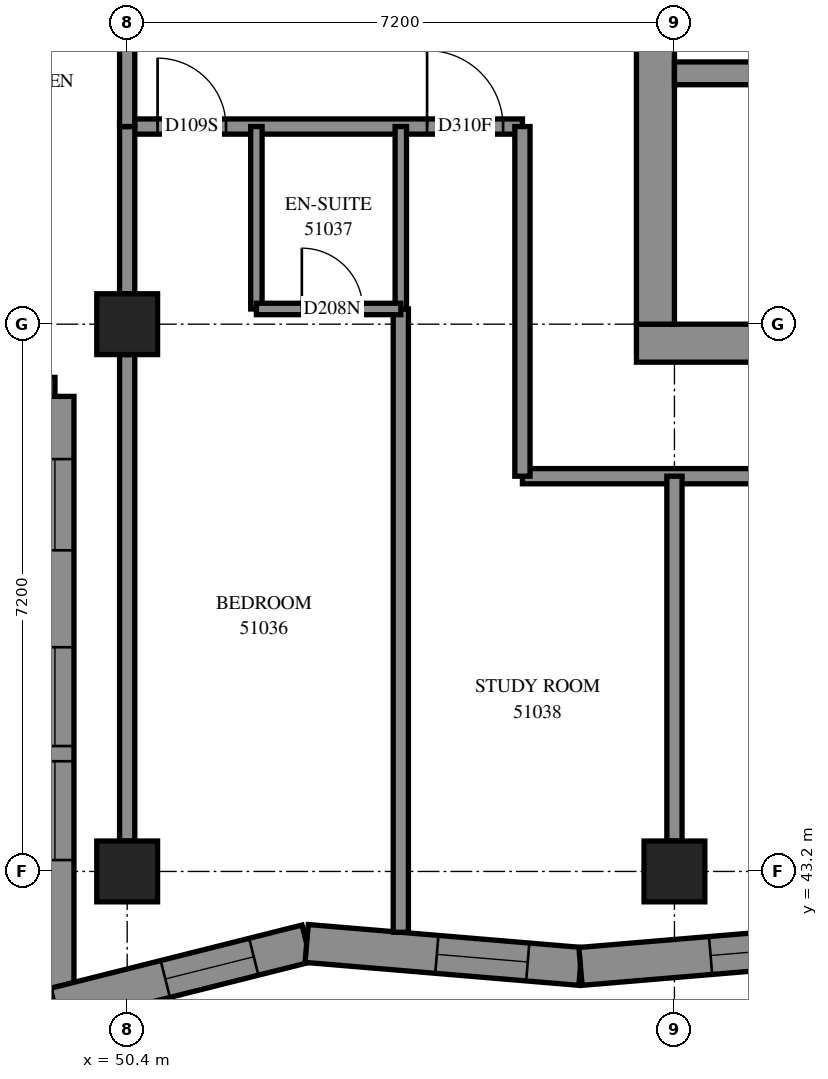
"""IFC4 building model, lengths in metres.
Left out: names, types, materials, properties, quantities, classifications, styles, units other than length and angle.
Written with IfcOpenShell. Run it as: python <this file> out.ifc"""

import sys

from ifc_helpers import new_model, si_unit, direction, frame, frame_2d, origin, origin_2d, place, context, subcontext, project, spatial, polyline, rectangle, outline, extrude, element, fill, save


model = new_model("IFC4")
c1 = context("Model", 3, precision=1e-05, world=origin(), true_north=direction((0.0, 1.0)))
c2 = subcontext(c1, "Body", "Model", "MODEL_VIEW")
j1 = project(units=[si_unit("LENGTHUNIT", "METRE"), si_unit("PLANEANGLEUNIT", "RADIAN")], contexts=[c1])
p1 = place(None, origin())
s1 = spatial("IfcSite", under=j1, at=p1, CompositionType="ELEMENT")
p2 = place(p1, origin())
s2 = spatial("IfcBuilding", under=s1, at=p2, CompositionType="ELEMENT")
p3 = place(p2, frame((0.0, 0.0, 189.6)))
s3 = spatial("IfcBuildingStorey", under=s2, at=p3, CompositionType="ELEMENT", Elevation=189.6)
for number, where, z_axis, x_axis in (
    (1, (50.4, 43.2, 0.0), (0.0, 0.0, 1.0), (1.0, 0.0, 0.0)),
    (2, (50.4, 50.4, 0.0), (0.0, 0.0, 1.0), (1.0, 0.0, 0.0)),
    (3, (57.6, 43.2, 0.0), (0.0, 0.0, 1.0), (1.0, 0.0, 0.0)),
):
    element("IfcColumn", number, at=place(p3, frame(where, z_axis=z_axis, x_axis=x_axis)), inside=s3, PredefinedType="COLUMN", context=c2, shape_type="SweptSolid", body=[
        extrude(rectangle(XDim=0.8, YDim=0.8, at=origin_2d()), origin(), (0.0, 0.0, 1.0), 3.1),
    ])
p4 = place(p3, frame((57.1, 50.15, -0.3), z_axis=(0.0, 0.0, 1.0), x_axis=(1.0, 0.0, 0.0)))
e4 = element("IfcWall", 4, at=p4, inside=s3, PredefinedType="SHEAR", context=c2, shape_type="SweptSolid", body=[
    extrude(rectangle(XDim=15.4, YDim=0.5, at=frame_2d((7.7, 0.0))), origin(), (0.0, 0.0, 1.0), 2.7),
])
p5 = place(p3, frame((57.35, 50.4, -0.3), z_axis=(0.0, 0.0, 1.0), x_axis=(0.0, 1.0, 0.0)))
e5 = element("IfcWall", 5, at=p5, inside=s3, PredefinedType="SHEAR", context=c2, shape_type="SweptSolid", body=[
    extrude(rectangle(XDim=14.4, YDim=0.5, at=frame_2d((7.2, 0.0))), origin(), (0.0, 0.0, 1.0), 2.7),
])
p6 = place(p5, frame((4.55, 0.0, 0.3)))
e6 = element("IfcOpeningElement", 6, at=p6, cuts=e5, PredefinedType="OPENING", context=c2, shape_type="SweptSolid", body=[
    extrude(rectangle(XDim=1.1, YDim=2.1, at=frame_2d((0.55, 1.05))), frame((0.0, 0.26, 0.0), z_axis=(0.0, -1.0, 0.0), x_axis=(1.0, 0.0, 0.0)), (0.0, 0.0, 1.0), 0.52),
])
p7 = place(p5, frame((11.35, 0.0, 0.3)))
e7 = element("IfcOpeningElement", 7, at=p7, cuts=e5, PredefinedType="OPENING", context=c2, shape_type="SweptSolid", body=[
    extrude(rectangle(XDim=1.1, YDim=2.1, at=frame_2d((0.55, 1.05))), frame((0.0, 0.26, 0.0), z_axis=(0.0, -1.0, 0.0), x_axis=(1.0, 0.0, 0.0)), (0.0, 0.0, 1.0), 0.52),
])
p8 = place(p3, frame((57.6, 53.7, 0.0), z_axis=(0.0, 0.0, 1.0), x_axis=(1.0, 0.0, 0.0)))
e8 = element("IfcWall", 8, at=p8, inside=s3, PredefinedType="SOLIDWALL", context=c2, shape_type="SweptSolid", body=[
    extrude(rectangle(XDim=14.4, YDim=0.3, at=frame_2d((7.2, 0.0))), origin(), (0.0, 0.0, 1.0), 3.1),
])
p9 = place(p8, frame((1.35, 0.0, 0.0)))
e9 = element("IfcOpeningElement", 9, at=p9, cuts=e8, PredefinedType="OPENING", context=c2, shape_type="SweptSolid", body=[
    extrude(rectangle(XDim=0.9, YDim=2.1, at=frame_2d((0.45, 1.05))), frame((0.0, 0.16, 0.0), z_axis=(0.0, -1.0, 0.0), x_axis=(1.0, 0.0, 0.0)), (0.0, 0.0, 1.0), 0.32),
])
p10 = place(p8, frame((4.95, 0.0, 0.0)))
e10 = element("IfcOpeningElement", 10, at=p10, cuts=e8, PredefinedType="OPENING", context=c2, shape_type="SweptSolid", body=[
    extrude(rectangle(XDim=0.9, YDim=2.1, at=frame_2d((0.45, 1.05))), frame((0.0, 0.16, 0.0), z_axis=(0.0, -1.0, 0.0), x_axis=(1.0, 0.0, 0.0)), (0.0, 0.0, 1.0), 0.32),
])
p11 = place(p8, frame((8.55, 0.0, 0.0)))
e11 = element("IfcOpeningElement", 11, at=p11, cuts=e8, PredefinedType="OPENING", context=c2, shape_type="SweptSolid", body=[
    extrude(rectangle(XDim=0.9, YDim=2.1, at=frame_2d((0.45, 1.05))), frame((0.0, 0.16, 0.0), z_axis=(0.0, -1.0, 0.0), x_axis=(1.0, 0.0, 0.0)), (0.0, 0.0, 1.0), 0.32),
])
p12 = place(p8, frame((12.05, 0.0, 0.0)))
e12 = element("IfcOpeningElement", 12, at=p12, cuts=e8, PredefinedType="OPENING", context=c2, shape_type="SweptSolid", body=[
    extrude(rectangle(XDim=1.1, YDim=2.1, at=frame_2d((0.55, 1.05))), frame((0.0, 0.16, 0.0), z_axis=(0.0, -1.0, 0.0), x_axis=(1.0, 0.0, 0.0)), (0.0, 0.0, 1.0), 0.32),
])
p13 = place(p3, frame((42.25, 49.45, 0.0), z_axis=(0.0, 0.0, 1.0), x_axis=(1.0, 0.0, 0.0)))
e13 = element("IfcWall", 13, at=p13, inside=s3, PredefinedType="SOLIDWALL", context=c2, shape_type="SweptSolid", body=[
    extrude(outline(polyline([(-0.25, -0.25), (6.95, -0.25), (7.45, 0.25), (0.25, 0.25), (-0.25, -0.25)])), origin(), (0.0, 0.0, 1.0), 3.1),
])
p14 = place(p13, frame((1.35, 0.0, 0.45)))
e14 = element("IfcOpeningElement", 14, at=p14, cuts=e13, PredefinedType="OPENING", context=c2, shape_type="SweptSolid", body=[
    extrude(rectangle(XDim=1.3, YDim=2.5, at=frame_2d((0.65, 1.25))), frame((0.0, 0.26, 0.0), z_axis=(0.0, -1.0, 0.0), x_axis=(1.0, 0.0, 0.0)), (0.0, 0.0, 1.0), 0.52),
])
p15 = place(p13, frame((2.85, 0.0, 0.45)))
e15 = element("IfcOpeningElement", 15, at=p15, cuts=e13, PredefinedType="OPENING", context=c2, shape_type="SweptSolid", body=[
    extrude(rectangle(XDim=1.3, YDim=2.5, at=frame_2d((0.65, 1.25))), frame((0.0, 0.26, 0.0), z_axis=(0.0, -1.0, 0.0), x_axis=(1.0, 0.0, 0.0)), (0.0, 0.0, 1.0), 0.52),
])
p16 = place(p13, frame((5.175, 0.0, 0.45)))
e16 = element("IfcOpeningElement", 16, at=p16, cuts=e13, PredefinedType="OPENING", context=c2, shape_type="SweptSolid", body=[
    extrude(rectangle(XDim=1.2, YDim=2.5, at=frame_2d((0.6, 1.25))), frame((0.0, 0.26, 0.0), z_axis=(0.0, -1.0, 0.0), x_axis=(1.0, 0.0, 0.0)), (0.0, 0.0, 1.0), 0.52),
])
p17 = place(p3, frame((49.45, 49.45, 0.0), z_axis=(0.0, 0.0, 1.0), x_axis=(0.0, -1.0, 0.0)))
e17 = element("IfcWall", 17, at=p17, inside=s3, PredefinedType="SOLIDWALL", context=c2, shape_type="SweptSolid", body=[
    extrude(outline(polyline([(0.25, -0.25), (8.35, -0.25), (7.709, 0.25), (-0.25, 0.25), (0.25, -0.25)])), origin(), (0.0, 0.0, 1.0), 3.1),
])
p18 = place(p17, frame((3.3, 0.0, 0.45)))
e18 = element("IfcOpeningElement", 18, at=p18, cuts=e17, PredefinedType="OPENING", context=c2, shape_type="SweptSolid", body=[
    extrude(rectangle(XDim=1.3, YDim=2.5, at=frame_2d((0.65, 1.25))), frame((0.0, 0.26, 0.0), z_axis=(0.0, -1.0, 0.0), x_axis=(1.0, 0.0, 0.0)), (0.0, 0.0, 1.0), 0.52),
])
p19 = place(p17, frame((4.8, 0.0, 0.45)))
e19 = element("IfcOpeningElement", 19, at=p19, cuts=e17, PredefinedType="OPENING", context=c2, shape_type="SweptSolid", body=[
    extrude(rectangle(XDim=1.3, YDim=2.5, at=frame_2d((0.65, 1.25))), frame((0.0, 0.26, 0.0), z_axis=(0.0, -1.0, 0.0), x_axis=(1.0, 0.0, 0.0)), (0.0, 0.0, 1.0), 0.52),
])
p20 = place(p17, frame((0.825, 0.0, 0.45)))
e20 = element("IfcOpeningElement", 20, at=p20, cuts=e17, PredefinedType="OPENING", context=c2, shape_type="SweptSolid", body=[
    extrude(rectangle(XDim=1.2, YDim=2.5, at=frame_2d((0.6, 1.25))), frame((0.0, 0.26, 0.0), z_axis=(0.0, -1.0, 0.0), x_axis=(1.0, 0.0, 0.0)), (0.0, 0.0, 1.0), 0.52),
])
p21 = place(p3, frame((49.45, 41.421, 0.0), z_axis=(0.0, 0.0, 1.0), x_axis=(0.9698558331, 0.2436794266, 0.0)))
e21 = element("IfcWall", 21, at=p21, inside=s3, PredefinedType="SOLIDWALL", context=c2, shape_type="SweptSolid", body=[
    extrude(outline(polyline([(-0.321, -0.25), (3.373, -0.25), (3.456, 0.25), (0.321, 0.25), (-0.321, -0.25)])), origin(), (0.0, 0.0, 1.0), 3.1),
])
p22 = place(p21, frame((1.497, 0.0, 0.45)))
e22 = element("IfcOpeningElement", 22, at=p22, cuts=e21, PredefinedType="OPENING", context=c2, shape_type="SweptSolid", body=[
    extrude(rectangle(XDim=1.2, YDim=2.5, at=frame_2d((0.6, 1.25))), frame((0.0, 0.26, 0.0), z_axis=(0.0, -1.0, 0.0), x_axis=(1.0, 0.0, 0.0)), (0.0, 0.0, 1.0), 0.52),
])
p23 = place(p3, frame((52.761, 42.253, 0.0), z_axis=(0.0, 0.0, 1.0), x_axis=(0.9965117188, -0.0834529466, 0.0)))
e23 = element("IfcWall", 23, at=p23, inside=s3, PredefinedType="SOLIDWALL", context=c2, shape_type="SweptSolid", body=[
    extrude(outline(polyline([(0.042, -0.25), (3.636, -0.25), (3.594, 0.25), (-0.042, 0.25), (0.042, -0.25)])), origin(), (0.0, 0.0, 1.0), 3.1),
])
p24 = place(p23, frame((1.719, 0.0, 0.45)))
e24 = element("IfcOpeningElement", 24, at=p24, cuts=e23, PredefinedType="OPENING", context=c2, shape_type="SweptSolid", body=[
    extrude(rectangle(XDim=1.2, YDim=2.5, at=frame_2d((0.6, 1.25))), frame((0.0, 0.26, 0.0), z_axis=(0.0, -1.0, 0.0), x_axis=(1.0, 0.0, 0.0)), (0.0, 0.0, 1.0), 0.52),
])
p25 = place(p3, frame((56.364, 41.951, 0.0), z_axis=(0.0, 0.0, 1.0), x_axis=(0.9965111369, 0.0834598942, 0.0)))
e25 = element("IfcWall", 25, at=p25, inside=s3, PredefinedType="SOLIDWALL", context=c2, shape_type="SweptSolid", body=[
    extrude(outline(polyline([(-0.021, -0.25), (3.574, -0.25), (3.615, 0.25), (0.021, 0.25), (-0.021, -0.25)])), origin(), (0.0, 0.0, 1.0), 3.1),
])
p26 = place(p25, frame((1.717, 0.0, 0.45)))
e26 = element("IfcOpeningElement", 26, at=p26, cuts=e25, PredefinedType="OPENING", context=c2, shape_type="SweptSolid", body=[
    extrude(rectangle(XDim=1.2, YDim=2.5, at=frame_2d((0.6, 1.25))), frame((0.0, 0.26, 0.0), z_axis=(0.0, -1.0, 0.0), x_axis=(1.0, 0.0, 0.0)), (0.0, 0.0, 1.0), 0.52),
])
p27 = place(p3, frame((55.6, 48.4, 0.0), z_axis=(0.0, 0.0, 1.0), x_axis=(1.0, 0.0, 0.0)))
e27 = element("IfcWall", 27, at=p27, inside=s3, PredefinedType="PARTITIONING", context=c2, shape_type="SweptSolid", body=[
    extrude(rectangle(XDim=18.4, YDim=0.2, at=frame_2d((9.2, 0.0))), origin(), (0.0, 0.0, 1.0), 3.1),
])
p28 = place(p27, frame((5.862, 0.0, 0.0)))
e28 = element("IfcOpeningElement", 28, at=p28, cuts=e27, PredefinedType="OPENING", context=c2, shape_type="SweptSolid", body=[
    extrude(rectangle(XDim=1.0, YDim=2.1, at=frame_2d((0.5, 1.05))), frame((0.0, 0.11, 0.0), z_axis=(0.0, -1.0, 0.0), x_axis=(1.0, 0.0, 0.0)), (0.0, 0.0, 1.0), 0.22),
])
p29 = place(p27, frame((11.5, 0.0, 0.0)))
e29 = element("IfcOpeningElement", 29, at=p29, cuts=e27, PredefinedType="OPENING", context=c2, shape_type="SweptSolid", body=[
    extrude(rectangle(XDim=0.9, YDim=2.1, at=frame_2d((0.45, 1.05))), frame((0.0, 0.11, 0.0), z_axis=(0.0, -1.0, 0.0), x_axis=(1.0, 0.0, 0.0)), (0.0, 0.0, 1.0), 0.22),
])
p30 = place(p27, frame((13.2, 0.0, 0.0)))
e30 = element("IfcOpeningElement", 30, at=p30, cuts=e27, PredefinedType="OPENING", context=c2, shape_type="SweptSolid", body=[
    extrude(rectangle(XDim=0.9, YDim=2.1, at=frame_2d((0.45, 1.05))), frame((0.0, 0.11, 0.0), z_axis=(0.0, -1.0, 0.0), x_axis=(1.0, 0.0, 0.0)), (0.0, 0.0, 1.0), 0.22),
])
p31 = place(p3, frame((54.0, 42.4, 0.0), z_axis=(0.0, 0.0, 1.0), x_axis=(0.0, 1.0, 0.0)))
e31 = element("IfcWall", 31, at=p31, inside=s3, PredefinedType="PARTITIONING", context=c2, shape_type="SweptSolid", body=[
    extrude(rectangle(XDim=8.2, YDim=0.2, at=frame_2d((4.1, 0.0))), origin(), (0.0, 0.0, 1.0), 3.1),
])
p32 = place(p3, frame((50.4, 43.6, 0.0), z_axis=(0.0, 0.0, 1.0), x_axis=(0.0, 1.0, 0.0)))
e32 = element("IfcWall", 32, at=p32, inside=s3, PredefinedType="PARTITIONING", context=c2, shape_type="SweptSolid", body=[
    extrude(rectangle(XDim=6.4, YDim=0.2, at=frame_2d((3.2, 0.0))), origin(), (0.0, 0.0, 1.0), 2.6),
])
p33 = place(p3, frame((50.4, 53.0, 0.0), z_axis=(0.0, 0.0, 1.0), x_axis=(1.0, 0.0, 0.0)))
e33 = element("IfcWall", 33, at=p33, inside=s3, PredefinedType="PARTITIONING", context=c2, shape_type="SweptSolid", body=[
    extrude(rectangle(XDim=5.2, YDim=0.2, at=frame_2d((2.6, 0.0))), origin(), (0.0, 0.0, 1.0), 3.1),
])
p34 = place(p33, frame((0.4, 0.0, 0.0)))
e34 = element("IfcOpeningElement", 34, at=p34, cuts=e33, PredefinedType="OPENING", context=c2, shape_type="SweptSolid", body=[
    extrude(rectangle(XDim=0.9, YDim=2.1, at=frame_2d((0.45, 1.05))), frame((0.0, 0.11, 0.0), z_axis=(0.0, -1.0, 0.0), x_axis=(1.0, 0.0, 0.0)), (0.0, 0.0, 1.0), 0.22),
])
p35 = place(p33, frame((3.946, 0.0, 0.0)))
e35 = element("IfcOpeningElement", 35, at=p35, cuts=e33, PredefinedType="OPENING", context=c2, shape_type="SweptSolid", body=[
    extrude(rectangle(XDim=1.0, YDim=2.1, at=frame_2d((0.5, 1.05))), frame((0.0, 0.11, 0.0), z_axis=(0.0, -1.0, 0.0), x_axis=(1.0, 0.0, 0.0)), (0.0, 0.0, 1.0), 0.22),
])
p36 = place(p3, frame((57.6, 43.6, 0.0), z_axis=(0.0, 0.0, 1.0), x_axis=(0.0, 1.0, 0.0)))
e36 = element("IfcWall", 36, at=p36, inside=s3, PredefinedType="PARTITIONING", context=c2, shape_type="SweptSolid", body=[
    extrude(rectangle(XDim=4.8, YDim=0.2, at=frame_2d((2.4, 0.0))), origin(), (0.0, 0.0, 1.0), 3.1),
])
p37 = place(p3, frame((55.6, 48.4, 0.0), z_axis=(0.0, 0.0, 1.0), x_axis=(0.0, 1.0, 0.0)))
e37 = element("IfcWall", 37, at=p37, inside=s3, PredefinedType="PARTITIONING", context=c2, shape_type="SweptSolid", body=[
    extrude(rectangle(XDim=4.6, YDim=0.2, at=frame_2d((2.3, 0.0))), origin(), (0.0, 0.0, 1.0), 3.1),
])
for number, where, z_axis, x_axis in (
    (38, (52.1, 50.6, 0.0), (0.0, 0.0, 1.0), (0.0, 1.0, 0.0)),
    (39, (54.0, 50.6, 0.0), (0.0, 0.0, 1.0), (0.0, 1.0, 0.0)),
):
    element("IfcWall", number, at=place(p3, frame(where, z_axis=z_axis, x_axis=x_axis)), inside=s3, PredefinedType="PARTITIONING", context=c2, shape_type="SweptSolid", body=[
        extrude(rectangle(XDim=2.4, YDim=0.15, at=frame_2d((1.2, 0.0))), origin(), (0.0, 0.0, 1.0), 3.1),
    ])
p38 = place(p3, frame((50.4, 50.8, 0.0), z_axis=(0.0, 0.0, 1.0), x_axis=(0.0, 1.0, 0.0)))
e40 = element("IfcWall", 40, at=p38, inside=s3, PredefinedType="PARTITIONING", context=c2, shape_type="SweptSolid", body=[
    extrude(rectangle(XDim=2.2, YDim=0.2, at=frame_2d((1.1, 0.0))), origin(), (0.0, 0.0, 1.0), 3.1),
])
p39 = place(p3, frame((50.4, 53.0, 0.0), z_axis=(0.0, 0.0, 1.0), x_axis=(0.0, 1.0, 0.0)))
e41 = element("IfcWall", 41, at=p39, inside=s3, PredefinedType="PARTITIONING", context=c2, shape_type="SweptSolid", body=[
    extrude(rectangle(XDim=2.0, YDim=0.2, at=frame_2d((1.0, 0.0))), origin(), (0.0, 0.0, 1.0), 3.1),
])
p40 = place(p3, frame((52.1, 50.6, 0.0), z_axis=(0.0, 0.0, 1.0), x_axis=(1.0, 0.0, 0.0)))
e42 = element("IfcWall", 42, at=p40, inside=s3, PredefinedType="PARTITIONING", context=c2, shape_type="SweptSolid", body=[
    extrude(rectangle(XDim=1.9, YDim=0.15, at=frame_2d((0.95, 0.0))), origin(), (0.0, 0.0, 1.0), 3.1),
])
p41 = place(p40, frame((0.598, 0.0, 0.0)))
e43 = element("IfcOpeningElement", 43, at=p41, cuts=e42, PredefinedType="OPENING", context=c2, shape_type="SweptSolid", body=[
    extrude(rectangle(XDim=0.8, YDim=2.1, at=frame_2d((0.4, 1.05))), frame((0.0, 0.085, 0.0), z_axis=(0.0, -1.0, 0.0), x_axis=(1.0, 0.0, 0.0)), (0.0, 0.0, 1.0), 0.17),
])
p42 = place(p18, origin())
e44 = element("IfcWindow", 44, at=p42, inside=s3, PartitioningType="SINGLE_PANEL", PredefinedType="WINDOW", context=c2, shape_type="SweptSolid", body=[
    extrude(rectangle(XDim=1.3, YDim=2.5, at=frame_2d((0.65, 1.25))), frame((0.0, 0.18, 0.0), z_axis=(0.0, -1.0, 0.0), x_axis=(1.0, 0.0, 0.0)), (0.0, 0.0, 1.0), 0.06),
])
fill(e18, e44)
p43 = place(p19, origin())
e45 = element("IfcWindow", 45, at=p43, inside=s3, PartitioningType="SINGLE_PANEL", PredefinedType="WINDOW", context=c2, shape_type="SweptSolid", body=[
    extrude(rectangle(XDim=1.3, YDim=2.5, at=frame_2d((0.65, 1.25))), frame((0.0, 0.18, 0.0), z_axis=(0.0, -1.0, 0.0), x_axis=(1.0, 0.0, 0.0)), (0.0, 0.0, 1.0), 0.06),
])
fill(e19, e45)
p44 = place(p20, origin())
e46 = element("IfcWindow", 46, at=p44, inside=s3, PartitioningType="SINGLE_PANEL", PredefinedType="WINDOW", context=c2, shape_type="SweptSolid", body=[
    extrude(rectangle(XDim=1.2, YDim=2.5, at=frame_2d((0.6, 1.25))), frame((0.0, 0.18, 0.0), z_axis=(0.0, -1.0, 0.0), x_axis=(1.0, 0.0, 0.0)), (0.0, 0.0, 1.0), 0.06),
])
fill(e20, e46)
p45 = place(p22, origin())
e47 = element("IfcWindow", 47, at=p45, inside=s3, PartitioningType="SINGLE_PANEL", PredefinedType="WINDOW", context=c2, shape_type="SweptSolid", body=[
    extrude(rectangle(XDim=1.2, YDim=2.5, at=frame_2d((0.6, 1.25))), frame((0.0, 0.18, 0.0), z_axis=(0.0, -1.0, 0.0), x_axis=(1.0, 0.0, 0.0)), (0.0, 0.0, 1.0), 0.06),
])
fill(e22, e47)
p46 = place(p24, origin())
e48 = element("IfcWindow", 48, at=p46, inside=s3, PartitioningType="SINGLE_PANEL", PredefinedType="WINDOW", context=c2, shape_type="SweptSolid", body=[
    extrude(rectangle(XDim=1.2, YDim=2.5, at=frame_2d((0.6, 1.25))), frame((0.0, 0.18, 0.0), z_axis=(0.0, -1.0, 0.0), x_axis=(1.0, 0.0, 0.0)), (0.0, 0.0, 1.0), 0.06),
])
fill(e24, e48)
p47 = place(p26, origin())
e49 = element("IfcWindow", 49, at=p47, inside=s3, PartitioningType="SINGLE_PANEL", PredefinedType="WINDOW", context=c2, shape_type="SweptSolid", body=[
    extrude(rectangle(XDim=1.2, YDim=2.5, at=frame_2d((0.6, 1.25))), frame((0.0, 0.18, 0.0), z_axis=(0.0, -1.0, 0.0), x_axis=(1.0, 0.0, 0.0)), (0.0, 0.0, 1.0), 0.06),
])
fill(e26, e49)
p48 = place(p34, origin())
e50 = element("IfcDoor", 50, at=p48, inside=s3, OperationType="SINGLE_SWING_LEFT", PredefinedType="DOOR", context=c2, shape_type="SweptSolid", body=[
    extrude(rectangle(XDim=0.9, YDim=2.1, at=frame_2d((0.45, 1.05))), frame((0.0, 0.025, 0.0), z_axis=(0.0, -1.0, 0.0), x_axis=(1.0, 0.0, 0.0)), (0.0, 0.0, 1.0), 0.05),
])
fill(e34, e50)
p49 = place(p41, origin())
e51 = element("IfcDoor", 51, at=p49, inside=s3, OperationType="SINGLE_SWING_RIGHT", PredefinedType="DOOR", context=c2, shape_type="SweptSolid", body=[
    extrude(rectangle(XDim=0.8, YDim=2.1, at=frame_2d((0.4, 1.05))), frame((0.0, 0.025, 0.0), z_axis=(0.0, -1.0, 0.0), x_axis=(1.0, 0.0, 0.0)), (0.0, 0.0, 1.0), 0.05),
])
fill(e43, e51)
p50 = place(p35, origin())
e52 = element("IfcDoor", 52, at=p50, inside=s3, OperationType="SINGLE_SWING_RIGHT", PredefinedType="DOOR", context=c2, shape_type="SweptSolid", body=[
    extrude(rectangle(XDim=1.0, YDim=2.1, at=frame_2d((0.5, 1.05))), frame((0.0, 0.025, 0.0), z_axis=(0.0, -1.0, 0.0), x_axis=(1.0, 0.0, 0.0)), (0.0, 0.0, 1.0), 0.05),
])
fill(e35, e52)
save(model, sys.argv[1])
